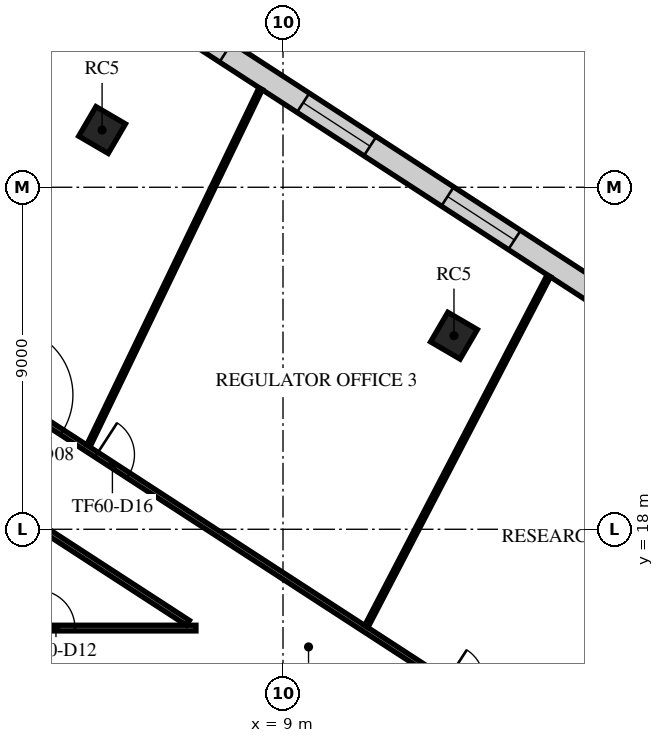
"""IFC4 building model, lengths in metres.
Left out: names, types, materials, properties, quantities, classifications, styles, units other than length and angle.
Written with IfcOpenShell. Run it as: python <this file> out.ifc"""

import sys

from ifc_helpers import new_model, si_unit, direction, frame, frame_2d, origin, origin_2d, place, context, subcontext, project, spatial, rectangle, extrude, element, fill, save


model = new_model("IFC4")
c1 = context("Model", 3, precision=1e-05, world=origin(), true_north=direction((0.0, 1.0)))
c2 = subcontext(c1, "Body", "Model", "MODEL_VIEW")
j1 = project(units=[si_unit("LENGTHUNIT", "METRE"), si_unit("PLANEANGLEUNIT", "RADIAN")], contexts=[c1])
p1 = place(None, origin())
s1 = spatial("IfcSite", under=j1, at=p1, CompositionType="ELEMENT")
p2 = place(p1, origin())
s2 = spatial("IfcBuilding", under=s1, at=p2, CompositionType="ELEMENT")
p3 = place(p2, frame((0.0, 0.0, 254.9)))
s3 = spatial("IfcBuildingStorey", under=s2, at=p3, CompositionType="ELEMENT", Elevation=254.9)
for number, where, z_axis, x_axis in (
    (1, (13.499, 23.094, 0.0), (0.0, 0.0, 1.0), (0.505, 0.863, 0.0)),
    (2, (4.24, 28.506, 0.0), (0.0, 0.0, 1.0), (0.505, 0.863, 0.0)),
):
    element("IfcColumn", number, at=place(p3, frame(where, z_axis=z_axis, x_axis=x_axis)), inside=s3, PredefinedType="COLUMN", context=c2, shape_type="SweptSolid", body=[
        extrude(rectangle(XDim=0.9, YDim=0.9, at=origin_2d()), origin(), (0.0, 0.0, 1.0), 4.0),
    ])
p4 = place(p3, frame((31.308, 15.082, 0.0), z_axis=(0.0, 0.0, 1.0), x_axis=(-0.838672242303, 0.544636456721, 0.0)))
e3 = element("IfcWall", 3, at=p4, inside=s3, PredefinedType="STANDARD", context=c2, shape_type="SweptSolid", body=[
    extrude(rectangle(XDim=36.243, YDim=0.6, at=frame_2d((18.122, 0.0))), origin(), (0.0, 0.0, 1.0), 3.64),
])
p5 = place(p4, frame((1.215, 0.0, 0.9)))
e4 = element("IfcOpeningElement", 4, at=p5, cuts=e3, PredefinedType="OPENING", context=c2, shape_type="SweptSolid", body=[
    extrude(rectangle(XDim=2.1, YDim=2.1, at=frame_2d((1.05, 1.05))), frame((0.0, 0.31, 0.0), z_axis=(0.0, -1.0, 0.0), x_axis=(1.0, 0.0, 0.0)), (0.0, 0.0, 1.0), 0.62),
])
p6 = place(p4, frame((5.746, 0.0, 0.9)))
e5 = element("IfcOpeningElement", 5, at=p6, cuts=e3, PredefinedType="OPENING", context=c2, shape_type="SweptSolid", body=[
    extrude(rectangle(XDim=2.1, YDim=2.1, at=frame_2d((1.05, 1.05))), frame((0.0, 0.31, 0.0), z_axis=(0.0, -1.0, 0.0), x_axis=(1.0, 0.0, 0.0)), (0.0, 0.0, 1.0), 0.62),
])
p7 = place(p4, frame((10.276, 0.0, 0.9)))
e6 = element("IfcOpeningElement", 6, at=p7, cuts=e3, PredefinedType="OPENING", context=c2, shape_type="SweptSolid", body=[
    extrude(rectangle(XDim=2.1, YDim=2.1, at=frame_2d((1.05, 1.05))), frame((0.0, 0.31, 0.0), z_axis=(0.0, -1.0, 0.0), x_axis=(1.0, 0.0, 0.0)), (0.0, 0.0, 1.0), 0.62),
])
p8 = place(p4, frame((14.806, 0.0, 0.9)))
e7 = element("IfcOpeningElement", 7, at=p8, cuts=e3, PredefinedType="OPENING", context=c2, shape_type="SweptSolid", body=[
    extrude(rectangle(XDim=2.1, YDim=2.1, at=frame_2d((1.05, 1.05))), frame((0.0, 0.31, 0.0), z_axis=(0.0, -1.0, 0.0), x_axis=(1.0, 0.0, 0.0)), (0.0, 0.0, 1.0), 0.62),
])
p9 = place(p4, frame((19.337, 0.0, 0.9)))
e8 = element("IfcOpeningElement", 8, at=p9, cuts=e3, PredefinedType="OPENING", context=c2, shape_type="SweptSolid", body=[
    extrude(rectangle(XDim=2.1, YDim=2.1, at=frame_2d((1.05, 1.05))), frame((0.0, 0.31, 0.0), z_axis=(0.0, -1.0, 0.0), x_axis=(1.0, 0.0, 0.0)), (0.0, 0.0, 1.0), 0.62),
])
p10 = place(p4, frame((23.867, 0.0, 0.9)))
e9 = element("IfcOpeningElement", 9, at=p10, cuts=e3, PredefinedType="OPENING", context=c2, shape_type="SweptSolid", body=[
    extrude(rectangle(XDim=2.1, YDim=2.1, at=frame_2d((1.05, 1.05))), frame((0.0, 0.31, 0.0), z_axis=(0.0, -1.0, 0.0), x_axis=(1.0, 0.0, 0.0)), (0.0, 0.0, 1.0), 0.62),
])
p11 = place(p4, frame((28.398, 0.0, 0.9)))
e10 = element("IfcOpeningElement", 10, at=p11, cuts=e3, PredefinedType="OPENING", context=c2, shape_type="SweptSolid", body=[
    extrude(rectangle(XDim=2.1, YDim=2.1, at=frame_2d((1.05, 1.05))), frame((0.0, 0.31, 0.0), z_axis=(0.0, -1.0, 0.0), x_axis=(1.0, 0.0, 0.0)), (0.0, 0.0, 1.0), 0.62),
])
p12 = place(p4, frame((32.928, 0.0, 0.9)))
e11 = element("IfcOpeningElement", 11, at=p12, cuts=e3, PredefinedType="OPENING", context=c2, shape_type="SweptSolid", body=[
    extrude(rectangle(XDim=2.1, YDim=2.1, at=frame_2d((1.05, 1.05))), frame((0.0, 0.31, 0.0), z_axis=(0.0, -1.0, 0.0), x_axis=(1.0, 0.0, 0.0)), (0.0, 0.0, 1.0), 0.62),
])
p13 = place(p3, frame((-15.325, 15.4, 0.0), z_axis=(0.0, 0.0, 1.0), x_axis=(1.0, 0.0, 0.0)))
e12 = element("IfcWall", 12, at=p13, inside=s3, PredefinedType="PARTITIONING", context=c2, shape_type="SweptSolid", body=[
    extrude(rectangle(XDim=22.035, YDim=0.15, at=frame_2d((11.018, 0.0))), origin(), (0.0, 0.0, 1.0), 3.24),
])
p14 = place(p13, frame((6.3, 0.0, 0.0)))
e13 = element("IfcOpeningElement", 13, at=p14, cuts=e12, PredefinedType="OPENING", context=c2, shape_type="SweptSolid", body=[
    extrude(rectangle(XDim=1.0, YDim=2.1, at=frame_2d((0.5, 1.05))), frame((0.0, 0.085, 0.0), z_axis=(0.0, -1.0, 0.0), x_axis=(1.0, 0.0, 0.0)), (0.0, 0.0, 1.0), 0.17),
])
p15 = place(p13, frame((17.851, 0.0, 0.0)))
e14 = element("IfcOpeningElement", 14, at=p15, cuts=e12, PredefinedType="OPENING", context=c2, shape_type="SweptSolid", body=[
    extrude(rectangle(XDim=1.0, YDim=2.1, at=frame_2d((0.5, 1.05))), frame((0.0, 0.085, 0.0), z_axis=(0.0, -1.0, 0.0), x_axis=(1.0, 0.0, 0.0)), (0.0, 0.0, 1.0), 0.17),
])
p16 = place(p3, frame((-7.434, 24.585, 0.0), z_axis=(0.0, 0.0, 1.0), x_axis=(0.838669191056, -0.544641155232, 0.0)))
e15 = element("IfcWall", 15, at=p16, inside=s3, PredefinedType="PARTITIONING", context=c2, shape_type="SweptSolid", body=[
    extrude(rectangle(XDim=16.612, YDim=0.15, at=frame_2d((8.306, 0.0))), origin(), (0.0, 0.0, 1.0), 3.04),
])
p17 = place(p16, frame((2.307, 0.0, 0.0)))
e16 = element("IfcOpeningElement", 16, at=p17, cuts=e15, PredefinedType="OPENING", context=c2, shape_type="SweptSolid", body=[
    extrude(rectangle(XDim=1.0, YDim=2.1, at=frame_2d((0.5, 1.05))), frame((0.0, 0.085, 0.0), z_axis=(0.0, -1.0, 0.0), x_axis=(1.0, 0.0, 0.0)), (0.0, 0.0, 1.0), 0.17),
])
p18 = place(p3, frame((-6.127, 26.598, 0.0), z_axis=(0.0, 0.0, 1.0), x_axis=(0.838670911559, -0.544638505897, 0.0)))
e17 = element("IfcWall", 17, at=p18, inside=s3, PredefinedType="PARTITIONING", context=c2, shape_type="SweptSolid", body=[
    extrude(rectangle(XDim=39.325, YDim=0.15, at=frame_2d((19.663, 0.0))), origin(), (0.0, 0.0, 1.0), 3.04),
])
p19 = place(p18, frame((9.3, 0.0, 0.0)))
e18 = element("IfcOpeningElement", 18, at=p19, cuts=e17, PredefinedType="OPENING", context=c2, shape_type="SweptSolid", body=[
    extrude(rectangle(XDim=1.8, YDim=2.1, at=frame_2d((0.9, 1.05))), frame((0.0, 0.085, 0.0), z_axis=(0.0, -1.0, 0.0), x_axis=(1.0, 0.0, 0.0)), (0.0, 0.0, 1.0), 0.17),
])
p20 = place(p18, frame((12.185, 0.0, 0.0)))
e19 = element("IfcOpeningElement", 19, at=p20, cuts=e17, PredefinedType="OPENING", context=c2, shape_type="SweptSolid", body=[
    extrude(rectangle(XDim=1.0, YDim=2.1, at=frame_2d((0.5, 1.05))), frame((0.0, 0.085, 0.0), z_axis=(0.0, -1.0, 0.0), x_axis=(1.0, 0.0, 0.0)), (0.0, 0.0, 1.0), 0.17),
])
p21 = place(p18, frame((23.155, 0.0, 0.0)))
e20 = element("IfcOpeningElement", 20, at=p21, cuts=e17, PredefinedType="OPENING", context=c2, shape_type="SweptSolid", body=[
    extrude(rectangle(XDim=1.0, YDim=2.1, at=frame_2d((0.5, 1.05))), frame((0.0, 0.085, 0.0), z_axis=(0.0, -1.0, 0.0), x_axis=(1.0, 0.0, 0.0)), (0.0, 0.0, 1.0), 0.17),
])
p22 = place(p18, frame((30.544, 0.0, 0.0)))
e21 = element("IfcOpeningElement", 21, at=p22, cuts=e17, PredefinedType="OPENING", context=c2, shape_type="SweptSolid", body=[
    extrude(rectangle(XDim=1.0, YDim=2.1, at=frame_2d((0.5, 1.05))), frame((0.0, 0.085, 0.0), z_axis=(0.0, -1.0, 0.0), x_axis=(1.0, 0.0, 0.0)), (0.0, 0.0, 1.0), 0.17),
])
p23 = place(p18, frame((36.099, 0.0, 0.0)))
e22 = element("IfcOpeningElement", 22, at=p23, cuts=e17, PredefinedType="OPENING", context=c2, shape_type="SweptSolid", body=[
    extrude(rectangle(XDim=1.0, YDim=2.1, at=frame_2d((0.5, 1.05))), frame((0.0, 0.085, 0.0), z_axis=(0.0, -1.0, 0.0), x_axis=(1.0, 0.0, 0.0)), (0.0, 0.0, 1.0), 0.17),
])
p24 = place(p3, frame((3.881, 20.197, 0.0), z_axis=(0.0, 0.0, 1.0), x_axis=(0.434320892127, 0.900758215428, 0.0)))
e23 = element("IfcWall", 23, at=p24, inside=s3, PredefinedType="PARTITIONING", context=c2, shape_type="SweptSolid", body=[
    extrude(rectangle(XDim=10.43, YDim=0.1, at=frame_2d((5.215, 0.0))), origin(), (0.0, 0.0, 1.0), 3.04),
])
p25 = place(p3, frame((11.194, 15.445, 0.0), z_axis=(0.0, 0.0, 1.0), x_axis=(0.461705411455, 0.887033321264, 0.0)))
e24 = element("IfcWall", 24, at=p25, inside=s3, PredefinedType="PARTITIONING", context=c2, shape_type="SweptSolid", body=[
    extrude(rectangle(XDim=10.396, YDim=0.1, at=frame_2d((5.198, 0.0))), origin(), (0.0, 0.0, 1.0), 3.04),
])
p26 = place(p9, origin())
e25 = element("IfcWindow", 25, at=p26, inside=s3, PartitioningType="SINGLE_PANEL", PredefinedType="WINDOW", context=c2, shape_type="SweptSolid", body=[
    extrude(rectangle(XDim=2.1, YDim=2.1, at=frame_2d((1.05, 1.05))), frame((0.0, 0.03, 0.0), z_axis=(0.0, -1.0, 0.0), x_axis=(1.0, 0.0, 0.0)), (0.0, 0.0, 1.0), 0.06),
])
fill(e8, e25)
p27 = place(p10, origin())
e26 = element("IfcWindow", 26, at=p27, inside=s3, PartitioningType="SINGLE_PANEL", PredefinedType="WINDOW", context=c2, shape_type="SweptSolid", body=[
    extrude(rectangle(XDim=2.1, YDim=2.1, at=frame_2d((1.05, 1.05))), frame((0.0, 0.03, 0.0), z_axis=(0.0, -1.0, 0.0), x_axis=(1.0, 0.0, 0.0)), (0.0, 0.0, 1.0), 0.06),
])
fill(e9, e26)
p28 = place(p11, origin())
e27 = element("IfcWindow", 27, at=p28, inside=s3, PartitioningType="SINGLE_PANEL", PredefinedType="WINDOW", context=c2, shape_type="SweptSolid", body=[
    extrude(rectangle(XDim=2.1, YDim=2.1, at=frame_2d((1.05, 1.05))), frame((0.0, 0.03, 0.0), z_axis=(0.0, -1.0, 0.0), x_axis=(1.0, 0.0, 0.0)), (0.0, 0.0, 1.0), 0.06),
])
fill(e10, e27)
p29 = place(p19, origin())
e28 = element("IfcDoor", 28, at=p29, inside=s3, OperationType="DOUBLE_DOOR_SINGLE_SWING", PredefinedType="DOOR", context=c2, shape_type="SweptSolid", body=[
    extrude(rectangle(XDim=1.8, YDim=2.1, at=frame_2d((0.9, 1.05))), frame((0.0, 0.025, 0.0), z_axis=(0.0, -1.0, 0.0), x_axis=(1.0, 0.0, 0.0)), (0.0, 0.0, 1.0), 0.05),
])
fill(e18, e28)
p30 = place(p15, origin())
e29 = element("IfcDoor", 29, at=p30, inside=s3, OperationType="SINGLE_SWING_LEFT", PredefinedType="DOOR", context=c2, shape_type="SweptSolid", body=[
    extrude(rectangle(XDim=1.0, YDim=2.1, at=frame_2d((0.5, 1.05))), frame((0.0, 0.025, 0.0), z_axis=(0.0, -1.0, 0.0), x_axis=(1.0, 0.0, 0.0)), (0.0, 0.0, 1.0), 0.05),
])
fill(e14, e29)
p31 = place(p20, origin())
e30 = element("IfcDoor", 30, at=p31, inside=s3, OperationType="SINGLE_SWING_RIGHT", PredefinedType="DOOR", context=c2, shape_type="SweptSolid", body=[
    extrude(rectangle(XDim=1.0, YDim=2.1, at=frame_2d((0.5, 1.05))), frame((0.0, 0.025, 0.0), z_axis=(0.0, -1.0, 0.0), x_axis=(1.0, 0.0, 0.0)), (0.0, 0.0, 1.0), 0.05),
])
fill(e19, e30)
save(model, sys.argv[1])
